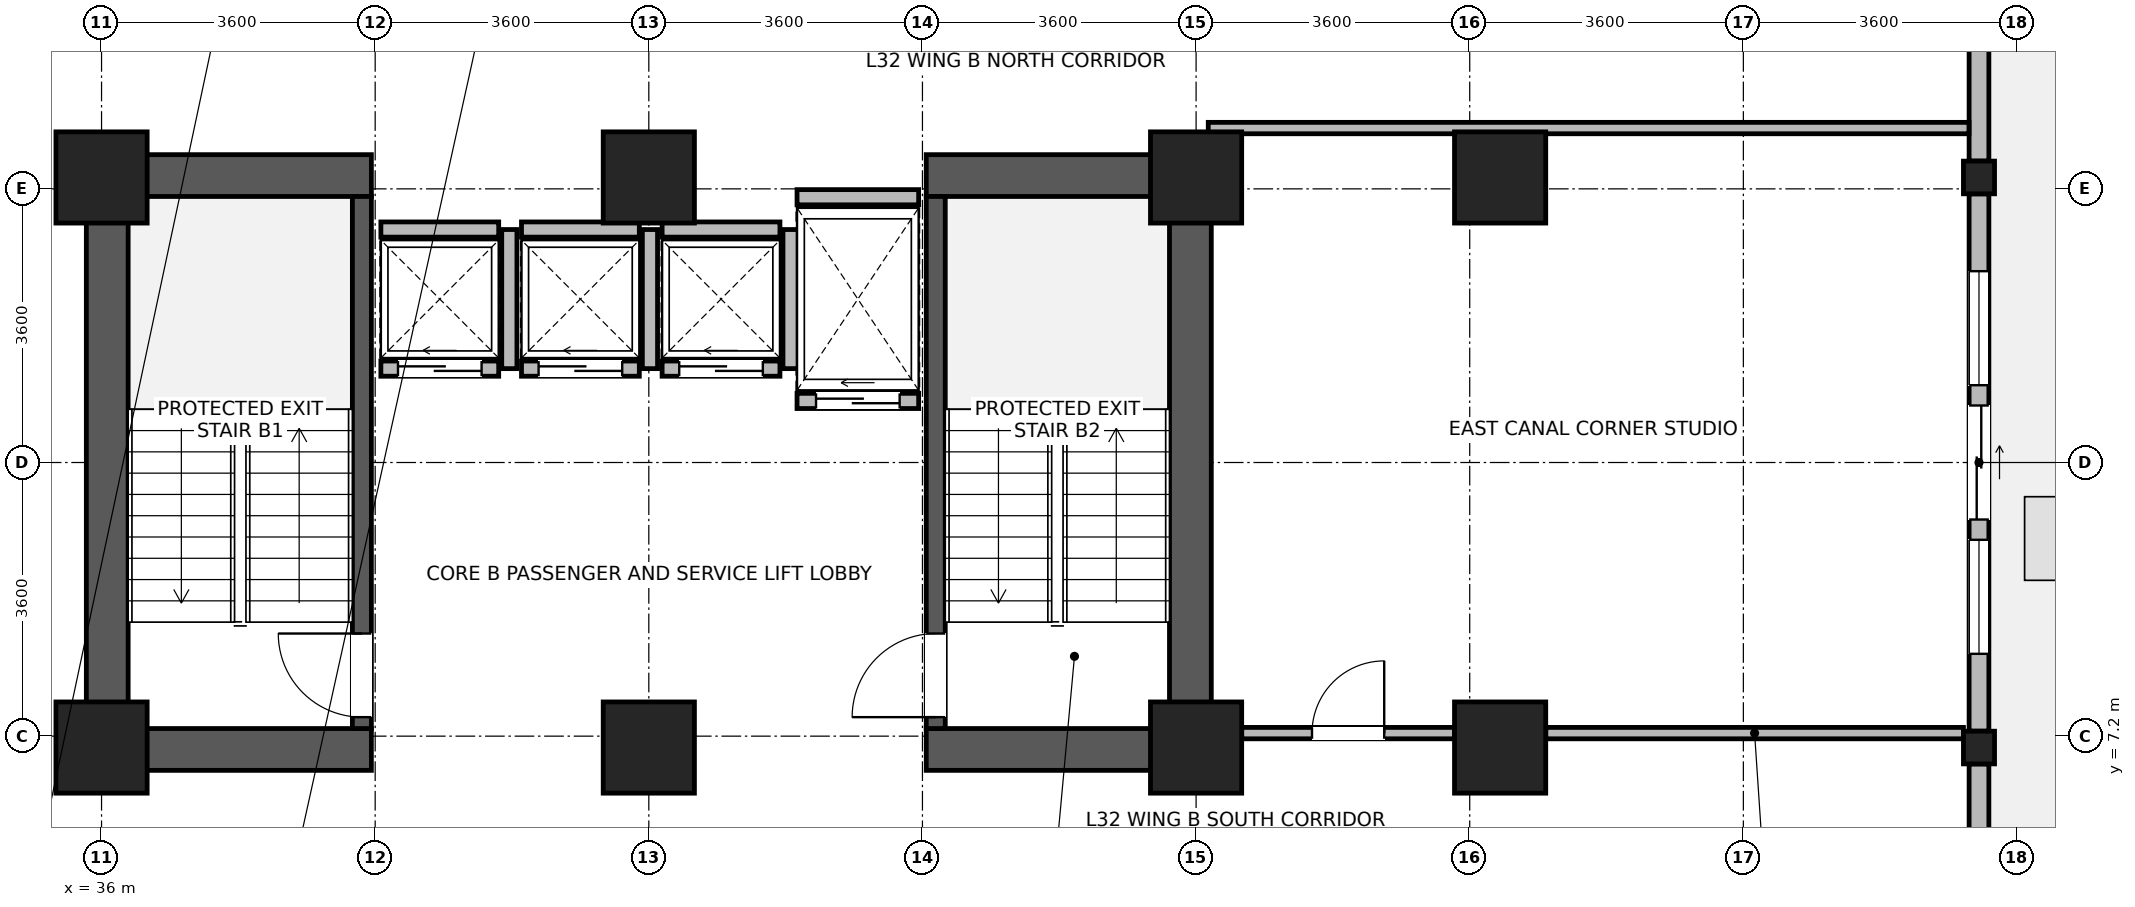
"""IFC4 building model, lengths in metres.
Left out: names, types, materials, properties, quantities, classifications, styles, units other than length and angle.
Written with IfcOpenShell. Run it as: python <this file> out.ifc"""

import sys

from ifc_helpers import new_model, si_unit, direction, frame, frame_2d, origin, origin_2d, place, context, subcontext, project, spatial, rectangle, i_section, extrude, source, transform, mapped, element, fill, save


model = new_model("IFC4")
c1 = context("Model", 3, precision=1e-05, world=origin(), true_north=direction((0.0, 1.0)))
c2 = subcontext(c1, "Body", "Model", "MODEL_VIEW")
j1 = project(units=[si_unit("LENGTHUNIT", "METRE"), si_unit("PLANEANGLEUNIT", "RADIAN")], contexts=[c1])
p1 = place(None, origin())
s1 = spatial("IfcSite", under=j1, at=p1, CompositionType="ELEMENT")
p2 = place(p1, origin())
s2 = spatial("IfcBuilding", under=s1, at=p2, CompositionType="ELEMENT")
p3 = place(p2, frame((0.0, 0.0, 126.7)))
s3 = spatial("IfcBuildingStorey", under=s2, at=p3, CompositionType="ELEMENT", Elevation=126.7)
for number, where, z_axis, x_axis in (
    (1, (36.075, 6.75, 0.0), (0.0, 0.0, 1.0), (0.0, 1.0, 0.0)),
    (2, (50.325, 6.75, 0.0), (0.0, 0.0, 1.0), (0.0, 1.0, 0.0)),
):
    element("IfcWall", number, at=place(p3, frame(where, z_axis=z_axis, x_axis=x_axis)), inside=s3, PredefinedType="SHEAR", context=c2, shape_type="SweptSolid", body=[
        extrude(rectangle(XDim=8.1, YDim=0.55, at=frame_2d((4.05, 0.0))), origin(), (0.0, 0.0, 1.0), 3.34),
    ])
for number, where, z_axis, x_axis in (
    (3, (36.35, 7.025, 0.0), (0.0, 0.0, 1.0), (1.0, 0.0, 0.0)),
    (4, (46.85, 7.025, 0.0), (0.0, 0.0, 1.0), (1.0, 0.0, 0.0)),
    (5, (36.35, 14.575, 0.0), (0.0, 0.0, 1.0), (1.0, 0.0, 0.0)),
    (6, (46.85, 14.575, 0.0), (0.0, 0.0, 1.0), (1.0, 0.0, 0.0)),
):
    element("IfcWall", number, at=place(p3, frame(where, z_axis=z_axis, x_axis=x_axis)), inside=s3, PredefinedType="SHEAR", context=c2, shape_type="SweptSolid", body=[
        extrude(rectangle(XDim=3.2, YDim=0.55, at=frame_2d((1.6, 0.0))), origin(), (0.0, 0.0, 1.0), 3.34),
    ])
p4 = place(p3, frame((39.425, 7.3, 0.0), z_axis=(0.0, 0.0, 1.0), x_axis=(0.0, 1.0, 0.0)))
e7 = element("IfcWall", 7, at=p4, inside=s3, PredefinedType="SHEAR", context=c2, shape_type="SweptSolid", body=[
    extrude(rectangle(XDim=7.0, YDim=0.25, at=frame_2d((3.5, 0.0))), origin(), (0.0, 0.0, 1.0), 3.34),
])
p5 = place(p4, frame((0.15, 0.0, 0.0)))
e8 = element("IfcOpeningElement", 8, at=p5, cuts=e7, PredefinedType="OPENING", context=c2, shape_type="SweptSolid", body=[
    extrude(rectangle(XDim=1.1, YDim=2.08, at=frame_2d((0.55, 1.04))), frame((0.0, 0.135, 0.0), z_axis=(0.0, -1.0, 0.0), x_axis=(1.0, 0.0, 0.0)), (0.0, 0.0, 1.0), 0.27),
])
p6 = place(p3, frame((46.975, 7.3, 0.0), z_axis=(0.0, 0.0, 1.0), x_axis=(0.0, 1.0, 0.0)))
e9 = element("IfcWall", 9, at=p6, inside=s3, PredefinedType="SHEAR", context=c2, shape_type="SweptSolid", body=[
    extrude(rectangle(XDim=7.0, YDim=0.25, at=frame_2d((3.5, 0.0))), origin(), (0.0, 0.0, 1.0), 3.34),
])
p7 = place(p6, frame((0.15, 0.0, 0.0)))
e10 = element("IfcOpeningElement", 10, at=p7, cuts=e9, PredefinedType="OPENING", context=c2, shape_type="SweptSolid", body=[
    extrude(rectangle(XDim=1.1, YDim=2.08, at=frame_2d((0.55, 1.04))), frame((0.0, 0.135, 0.0), z_axis=(0.0, -1.0, 0.0), x_axis=(1.0, 0.0, 0.0)), (0.0, 0.0, 1.0), 0.27),
])
m1 = source(origin(), c2, "Body", "SweptSolid", [
    extrude(rectangle(XDim=1.2, YDim=1.2, at=origin_2d()), origin(), (0.0, 0.0, 1.0), 3.7),
])
for number, where, z_axis, x_axis in (
    (11, (36.0, 7.05, 0.0), (0.0, 0.0, 1.0), (1.0, 0.0, 0.0)),
    (12, (36.0, 14.55, 0.0), (0.0, 0.0, 1.0), (1.0, 0.0, 0.0)),
    (13, (43.2, 7.05, 0.0), (0.0, 0.0, 1.0), (1.0, 0.0, 0.0)),
    (14, (43.2, 14.55, 0.0), (0.0, 0.0, 1.0), (1.0, 0.0, 0.0)),
    (15, (50.4, 7.05, 0.0), (0.0, 0.0, 1.0), (1.0, 0.0, 0.0)),
    (16, (50.4, 14.55, 0.0), (0.0, 0.0, 1.0), (1.0, 0.0, 0.0)),
    (17, (54.4, 7.05, 0.0), (0.0, 0.0, 1.0), (1.0, 0.0, 0.0)),
    (18, (54.4, 14.55, 0.0), (0.0, 0.0, 1.0), (1.0, 0.0, 0.0)),
):
    element("IfcColumn", number, at=place(p3, frame(where, z_axis=z_axis, x_axis=x_axis)), inside=s3, PredefinedType="COLUMN", context=c2, shape_type="MappedRepresentation", body=[
        mapped(m1, transform((0.0, 0.0, 0.0), x_axis=(1.0, 0.0, 0.0), y_axis=(0.0, 1.0, 0.0), z_axis=(0.0, 0.0, 1.0), scale=1.0)),
    ])
m2 = source(origin(), c2, "Body", "SweptSolid", [
    extrude(i_section(OverallWidth=0.409, OverallDepth=0.43, WebThickness=0.024, FlangeThickness=0.033, FilletRadius=0.015, at=origin_2d()), origin(), (0.0, 0.0, 1.0), 3.7),
])
for number, where, z_axis, x_axis in (
    (19, (60.7, 7.05, 0.0), (0.0, 0.0, 1.0), (1.0, 0.0, 0.0)),
    (20, (60.7, 14.55, 0.0), (0.0, 0.0, 1.0), (1.0, 0.0, 0.0)),
):
    element("IfcColumn", number, at=place(p3, frame(where, z_axis=z_axis, x_axis=x_axis)), inside=s3, PredefinedType="COLUMN", context=c2, shape_type="MappedRepresentation", body=[
        mapped(m2, transform((0.0, 0.0, 0.0), x_axis=(1.0, 0.0, 0.0), y_axis=(0.0, 1.0, 0.0), z_axis=(0.0, 0.0, 1.0), scale=1.0)),
    ])
p8 = place(p3, frame((60.7, 6.834, 0.0), z_axis=(0.0, 0.0, 1.0), x_axis=(0.0, -1.0, 0.0)))
e21 = element("IfcWall", 21, at=p8, inside=s3, PredefinedType="STANDARD", context=c2, shape_type="SweptSolid", body=[
    extrude(rectangle(XDim=2.164, YDim=0.26, at=frame_2d((1.082, 0.0))), origin(), (0.0, 0.0, 1.0), 3.32),
])
p9 = place(p3, frame((60.7, 14.334, 0.0), z_axis=(0.0, 0.0, 1.0), x_axis=(0.0, -1.0, 0.0)))
e22 = element("IfcWall", 22, at=p9, inside=s3, PredefinedType="STANDARD", context=c2, shape_type="SweptSolid", body=[
    extrude(rectangle(XDim=7.068, YDim=0.26, at=frame_2d((3.534, 0.0))), origin(), (0.0, 0.0, 1.0), 2.87),
])
p10 = place(p9, frame((2.784, 0.0, 0.0)))
e23 = element("IfcOpeningElement", 23, at=p10, cuts=e22, PredefinedType="OPENING", context=c2, shape_type="SweptSolid", body=[
    extrude(rectangle(XDim=1.5, YDim=2.15, at=frame_2d((0.75, 1.075))), frame((0.0, 0.14, 0.0), z_axis=(0.0, -1.0, 0.0), x_axis=(1.0, 0.0, 0.0)), (0.0, 0.0, 1.0), 0.28),
])
p11 = place(p9, frame((1.017, 0.0, 0.85)))
e24 = element("IfcOpeningElement", 24, at=p11, cuts=e22, PredefinedType="OPENING", context=c2, shape_type="SweptSolid", body=[
    extrude(rectangle(XDim=1.5, YDim=1.85, at=frame_2d((0.75, 0.925))), frame((0.0, 0.14, 0.0), z_axis=(0.0, -1.0, 0.0), x_axis=(1.0, 0.0, 0.0)), (0.0, 0.0, 1.0), 0.28),
])
p12 = place(p9, frame((4.551, 0.0, 0.85)))
e25 = element("IfcOpeningElement", 25, at=p12, cuts=e22, PredefinedType="OPENING", context=c2, shape_type="SweptSolid", body=[
    extrude(rectangle(XDim=1.5, YDim=1.85, at=frame_2d((0.75, 0.925))), frame((0.0, 0.14, 0.0), z_axis=(0.0, -1.0, 0.0), x_axis=(1.0, 0.0, 0.0)), (0.0, 0.0, 1.0), 0.28),
])
p13 = place(p3, frame((60.7, 21.384, 0.0), z_axis=(0.0, 0.0, 1.0), x_axis=(0.0, -1.0, 0.0)))
e26 = element("IfcWall", 26, at=p13, inside=s3, PredefinedType="STANDARD", context=c2, shape_type="SweptSolid", body=[
    extrude(rectangle(XDim=6.618, YDim=0.26, at=frame_2d((3.309, 0.0))), origin(), (0.0, 0.0, 1.0), 2.87),
])
p14 = place(p13, frame((0.905, 0.0, 0.85)))
e27 = element("IfcOpeningElement", 27, at=p14, cuts=e26, PredefinedType="OPENING", context=c2, shape_type="SweptSolid", body=[
    extrude(rectangle(XDim=1.5, YDim=1.85, at=frame_2d((0.75, 0.925))), frame((0.0, 0.14, 0.0), z_axis=(0.0, -1.0, 0.0), x_axis=(1.0, 0.0, 0.0)), (0.0, 0.0, 1.0), 0.28),
])
p15 = place(p13, frame((2.834, 0.0, 0.85)))
e28 = element("IfcOpeningElement", 28, at=p15, cuts=e26, PredefinedType="OPENING", context=c2, shape_type="SweptSolid", body=[
    extrude(rectangle(XDim=0.95, YDim=1.75, at=frame_2d((0.475, 0.875))), frame((0.0, 0.14, 0.0), z_axis=(0.0, -1.0, 0.0), x_axis=(1.0, 0.0, 0.0)), (0.0, 0.0, 1.0), 0.28),
])
p16 = place(p3, frame((39.675, 12.035, 0.0), z_axis=(0.0, 0.0, 1.0), x_axis=(1.0, 0.0, 0.0)))
e29 = element("IfcWall", 29, at=p16, inside=s3, PredefinedType="PARTITIONING", context=c2, shape_type="SweptSolid", body=[
    extrude(rectangle(XDim=1.55, YDim=0.2, at=frame_2d((0.775, 0.0))), origin(), (0.0, 0.0, 1.0), 3.32),
])
p17 = place(p16, frame((0.225, 0.0, 0.0)))
e30 = element("IfcOpeningElement", 30, at=p17, cuts=e29, PredefinedType="OPENING", context=c2, shape_type="SweptSolid", body=[
    extrude(rectangle(XDim=1.1, YDim=2.12, at=frame_2d((0.55, 1.06))), frame((0.0, 0.11, 0.0), z_axis=(0.0, -1.0, 0.0), x_axis=(1.0, 0.0, 0.0)), (0.0, 0.0, 1.0), 0.22),
])
p18 = place(p3, frame((39.675, 13.865, 0.0), z_axis=(0.0, 0.0, 1.0), x_axis=(1.0, 0.0, 0.0)))
e31 = element("IfcWall", 31, at=p18, inside=s3, PredefinedType="PARTITIONING", context=c2, shape_type="SweptSolid", body=[
    extrude(rectangle(XDim=1.55, YDim=0.2, at=frame_2d((0.775, 0.0))), origin(), (0.0, 0.0, 1.0), 3.32),
])
p19 = place(p3, frame((41.365, 12.035, 0.0), z_axis=(0.0, 0.0, 1.0), x_axis=(0.0, 1.0, 0.0)))
e32 = element("IfcWall", 32, at=p19, inside=s3, PredefinedType="PARTITIONING", context=c2, shape_type="SweptSolid", body=[
    extrude(rectangle(XDim=1.83, YDim=0.2, at=frame_2d((0.915, 0.0))), origin(), (0.0, 0.0, 1.0), 3.32),
])
p20 = place(p3, frame((41.525, 12.035, 0.0), z_axis=(0.0, 0.0, 1.0), x_axis=(1.0, 0.0, 0.0)))
e33 = element("IfcWall", 33, at=p20, inside=s3, PredefinedType="PARTITIONING", context=c2, shape_type="SweptSolid", body=[
    extrude(rectangle(XDim=1.55, YDim=0.2, at=frame_2d((0.775, 0.0))), origin(), (0.0, 0.0, 1.0), 3.32),
])
p21 = place(p20, frame((0.225, 0.0, 0.0)))
e34 = element("IfcOpeningElement", 34, at=p21, cuts=e33, PredefinedType="OPENING", context=c2, shape_type="SweptSolid", body=[
    extrude(rectangle(XDim=1.1, YDim=2.12, at=frame_2d((0.55, 1.06))), frame((0.0, 0.11, 0.0), z_axis=(0.0, -1.0, 0.0), x_axis=(1.0, 0.0, 0.0)), (0.0, 0.0, 1.0), 0.22),
])
p22 = place(p3, frame((41.525, 13.865, 0.0), z_axis=(0.0, 0.0, 1.0), x_axis=(1.0, 0.0, 0.0)))
e35 = element("IfcWall", 35, at=p22, inside=s3, PredefinedType="PARTITIONING", context=c2, shape_type="SweptSolid", body=[
    extrude(rectangle(XDim=1.55, YDim=0.2, at=frame_2d((0.775, 0.0))), origin(), (0.0, 0.0, 1.0), 3.32),
])
p23 = place(p3, frame((43.215, 12.035, 0.0), z_axis=(0.0, 0.0, 1.0), x_axis=(0.0, 1.0, 0.0)))
e36 = element("IfcWall", 36, at=p23, inside=s3, PredefinedType="PARTITIONING", context=c2, shape_type="SweptSolid", body=[
    extrude(rectangle(XDim=1.83, YDim=0.2, at=frame_2d((0.915, 0.0))), origin(), (0.0, 0.0, 1.0), 3.32),
])
p24 = place(p3, frame((43.375, 12.035, 0.0), z_axis=(0.0, 0.0, 1.0), x_axis=(1.0, 0.0, 0.0)))
e37 = element("IfcWall", 37, at=p24, inside=s3, PredefinedType="PARTITIONING", context=c2, shape_type="SweptSolid", body=[
    extrude(rectangle(XDim=1.55, YDim=0.2, at=frame_2d((0.775, 0.0))), origin(), (0.0, 0.0, 1.0), 3.32),
])
p25 = place(p24, frame((0.225, 0.0, 0.0)))
e38 = element("IfcOpeningElement", 38, at=p25, cuts=e37, PredefinedType="OPENING", context=c2, shape_type="SweptSolid", body=[
    extrude(rectangle(XDim=1.1, YDim=2.12, at=frame_2d((0.55, 1.06))), frame((0.0, 0.11, 0.0), z_axis=(0.0, -1.0, 0.0), x_axis=(1.0, 0.0, 0.0)), (0.0, 0.0, 1.0), 0.22),
])
p26 = place(p3, frame((43.375, 13.865, 0.0), z_axis=(0.0, 0.0, 1.0), x_axis=(1.0, 0.0, 0.0)))
e39 = element("IfcWall", 39, at=p26, inside=s3, PredefinedType="PARTITIONING", context=c2, shape_type="SweptSolid", body=[
    extrude(rectangle(XDim=1.55, YDim=0.2, at=frame_2d((0.775, 0.0))), origin(), (0.0, 0.0, 1.0), 3.32),
])
p27 = place(p3, frame((45.065, 12.035, 0.0), z_axis=(0.0, 0.0, 1.0), x_axis=(0.0, 1.0, 0.0)))
e40 = element("IfcWall", 40, at=p27, inside=s3, PredefinedType="PARTITIONING", context=c2, shape_type="SweptSolid", body=[
    extrude(rectangle(XDim=1.83, YDim=0.2, at=frame_2d((0.915, 0.0))), origin(), (0.0, 0.0, 1.0), 3.32),
])
p28 = place(p3, frame((45.15, 11.61, 0.0), z_axis=(0.0, 0.0, 1.0), x_axis=(1.0, 0.0, 0.0)))
e41 = element("IfcWall", 41, at=p28, inside=s3, PredefinedType="PARTITIONING", context=c2, shape_type="SweptSolid", body=[
    extrude(rectangle(XDim=1.6, YDim=0.2, at=frame_2d((0.8, 0.0))), origin(), (0.0, 0.0, 1.0), 3.32),
])
p29 = place(p28, frame((0.25, 0.0, 0.0)))
e42 = element("IfcOpeningElement", 42, at=p29, cuts=e41, PredefinedType="OPENING", context=c2, shape_type="SweptSolid", body=[
    extrude(rectangle(XDim=1.1, YDim=2.12, at=frame_2d((0.55, 1.06))), frame((0.0, 0.11, 0.0), z_axis=(0.0, -1.0, 0.0), x_axis=(1.0, 0.0, 0.0)), (0.0, 0.0, 1.0), 0.22),
])
p30 = place(p3, frame((45.15, 14.29, 0.0), z_axis=(0.0, 0.0, 1.0), x_axis=(1.0, 0.0, 0.0)))
e43 = element("IfcWall", 43, at=p30, inside=s3, PredefinedType="PARTITIONING", context=c2, shape_type="SweptSolid", body=[
    extrude(rectangle(XDim=1.6, YDim=0.2, at=frame_2d((0.8, 0.0))), origin(), (0.0, 0.0, 1.0), 2.32),
])
p31 = place(p3, frame((51.0, 7.24, 0.0), z_axis=(0.0, 0.0, 1.0), x_axis=(1.0, 0.0, 0.0)))
e44 = element("IfcWall", 44, at=p31, inside=s3, PredefinedType="PARTITIONING", context=c2, shape_type="SweptSolid", body=[
    extrude(rectangle(XDim=2.8, YDim=0.15, at=frame_2d((1.4, 0.0))), origin(), (0.0, 0.0, 1.0), 2.67),
])
p32 = place(p31, frame((0.925, 0.0, 0.0)))
e45 = element("IfcOpeningElement", 45, at=p32, cuts=e44, PredefinedType="OPENING", context=c2, shape_type="SweptSolid", body=[
    extrude(rectangle(XDim=0.95, YDim=2.1, at=frame_2d((0.475, 1.05))), frame((0.0, 0.085, 0.0), z_axis=(0.0, -1.0, 0.0), x_axis=(1.0, 0.0, 0.0)), (0.0, 0.0, 1.0), 0.17),
])
p33 = place(p3, frame((55.0, 7.24, 0.0), z_axis=(0.0, 0.0, 1.0), x_axis=(1.0, 0.0, 0.0)))
e46 = element("IfcWall", 46, at=p33, inside=s3, PredefinedType="PARTITIONING", context=c2, shape_type="SweptSolid", body=[
    extrude(rectangle(XDim=5.496, YDim=0.15, at=frame_2d((2.748, 0.0))), origin(), (0.0, 0.0, 1.0), 2.67),
])
p34 = place(p3, frame((50.56, 15.2, 0.0), z_axis=(0.0, 0.0, 1.0), x_axis=(1.0, 0.0, 0.0)))
e47 = element("IfcWall", 47, at=p34, inside=s3, PredefinedType="PARTITIONING", context=c2, shape_type="SweptSolid", body=[
    extrude(rectangle(XDim=10.008, YDim=0.15, at=frame_2d((5.004, 0.0))), origin(), (0.0, 0.0, 1.0), 3.32),
])
p35 = place(p10, origin())
e48 = element("IfcDoor", 48, at=p35, inside=s3, OperationType="SLIDING_TO_LEFT", PredefinedType="DOOR", context=c2, shape_type="SweptSolid", body=[
    extrude(rectangle(XDim=1.5, YDim=2.15, at=frame_2d((0.75, 1.075))), frame((0.0, 0.025, 0.0), z_axis=(0.0, -1.0, 0.0), x_axis=(1.0, 0.0, 0.0)), (0.0, 0.0, 1.0), 0.05),
])
fill(e23, e48)
p36 = place(p11, origin())
e49 = element("IfcWindow", 49, at=p36, inside=s3, PartitioningType="SINGLE_PANEL", PredefinedType="WINDOW", context=c2, shape_type="SweptSolid", body=[
    extrude(rectangle(XDim=1.5, YDim=1.85, at=frame_2d((0.75, 0.925))), frame((0.0, 0.03, 0.0), z_axis=(0.0, -1.0, 0.0), x_axis=(1.0, 0.0, 0.0)), (0.0, 0.0, 1.0), 0.06),
])
fill(e24, e49)
p37 = place(p12, origin())
e50 = element("IfcWindow", 50, at=p37, inside=s3, PartitioningType="SINGLE_PANEL", PredefinedType="WINDOW", context=c2, shape_type="SweptSolid", body=[
    extrude(rectangle(XDim=1.5, YDim=1.85, at=frame_2d((0.75, 0.925))), frame((0.0, 0.03, 0.0), z_axis=(0.0, -1.0, 0.0), x_axis=(1.0, 0.0, 0.0)), (0.0, 0.0, 1.0), 0.06),
])
fill(e25, e50)
p38 = place(p5, origin())
e51 = element("IfcDoor", 51, at=p38, inside=s3, OperationType="SINGLE_SWING_RIGHT", PredefinedType="DOOR", context=c2, shape_type="SweptSolid", body=[
    extrude(rectangle(XDim=1.1, YDim=2.08, at=frame_2d((0.55, 1.04))), frame((0.0, 0.025, 0.0), z_axis=(0.0, -1.0, 0.0), x_axis=(1.0, 0.0, 0.0)), (0.0, 0.0, 1.0), 0.05),
])
fill(e8, e51)
p39 = place(p7, origin())
e52 = element("IfcDoor", 52, at=p39, inside=s3, OperationType="SINGLE_SWING_LEFT", PredefinedType="DOOR", context=c2, shape_type="SweptSolid", body=[
    extrude(rectangle(XDim=1.1, YDim=2.08, at=frame_2d((0.55, 1.04))), frame((0.0, 0.025, 0.0), z_axis=(0.0, -1.0, 0.0), x_axis=(1.0, 0.0, 0.0)), (0.0, 0.0, 1.0), 0.05),
])
fill(e10, e52)
p40 = place(p17, origin())
e53 = element("IfcDoor", 53, at=p40, inside=s3, OperationType="SLIDING_TO_LEFT", PredefinedType="DOOR", context=c2, shape_type="SweptSolid", body=[
    extrude(rectangle(XDim=1.1, YDim=2.12, at=frame_2d((0.55, 1.06))), frame((0.0, 0.025, 0.0), z_axis=(0.0, -1.0, 0.0), x_axis=(1.0, 0.0, 0.0)), (0.0, 0.0, 1.0), 0.05),
])
fill(e30, e53)
p41 = place(p21, origin())
e54 = element("IfcDoor", 54, at=p41, inside=s3, OperationType="SLIDING_TO_LEFT", PredefinedType="DOOR", context=c2, shape_type="SweptSolid", body=[
    extrude(rectangle(XDim=1.1, YDim=2.12, at=frame_2d((0.55, 1.06))), frame((0.0, 0.025, 0.0), z_axis=(0.0, -1.0, 0.0), x_axis=(1.0, 0.0, 0.0)), (0.0, 0.0, 1.0), 0.05),
])
fill(e34, e54)
p42 = place(p25, origin())
e55 = element("IfcDoor", 55, at=p42, inside=s3, OperationType="SLIDING_TO_LEFT", PredefinedType="DOOR", context=c2, shape_type="SweptSolid", body=[
    extrude(rectangle(XDim=1.1, YDim=2.12, at=frame_2d((0.55, 1.06))), frame((0.0, 0.025, 0.0), z_axis=(0.0, -1.0, 0.0), x_axis=(1.0, 0.0, 0.0)), (0.0, 0.0, 1.0), 0.05),
])
fill(e38, e55)
p43 = place(p29, origin())
e56 = element("IfcDoor", 56, at=p43, inside=s3, OperationType="SLIDING_TO_LEFT", PredefinedType="DOOR", context=c2, shape_type="SweptSolid", body=[
    extrude(rectangle(XDim=1.1, YDim=2.12, at=frame_2d((0.55, 1.06))), frame((0.0, 0.025, 0.0), z_axis=(0.0, -1.0, 0.0), x_axis=(1.0, 0.0, 0.0)), (0.0, 0.0, 1.0), 0.05),
])
fill(e42, e56)
p44 = place(p32, origin())
e57 = element("IfcDoor", 57, at=p44, inside=s3, OperationType="SINGLE_SWING_RIGHT", PredefinedType="DOOR", context=c2, shape_type="SweptSolid", body=[
    extrude(rectangle(XDim=0.95, YDim=2.1, at=frame_2d((0.475, 1.05))), frame((0.0, 0.025, 0.0), z_axis=(0.0, -1.0, 0.0), x_axis=(1.0, 0.0, 0.0)), (0.0, 0.0, 1.0), 0.05),
])
fill(e45, e57)
save(model, sys.argv[1])
